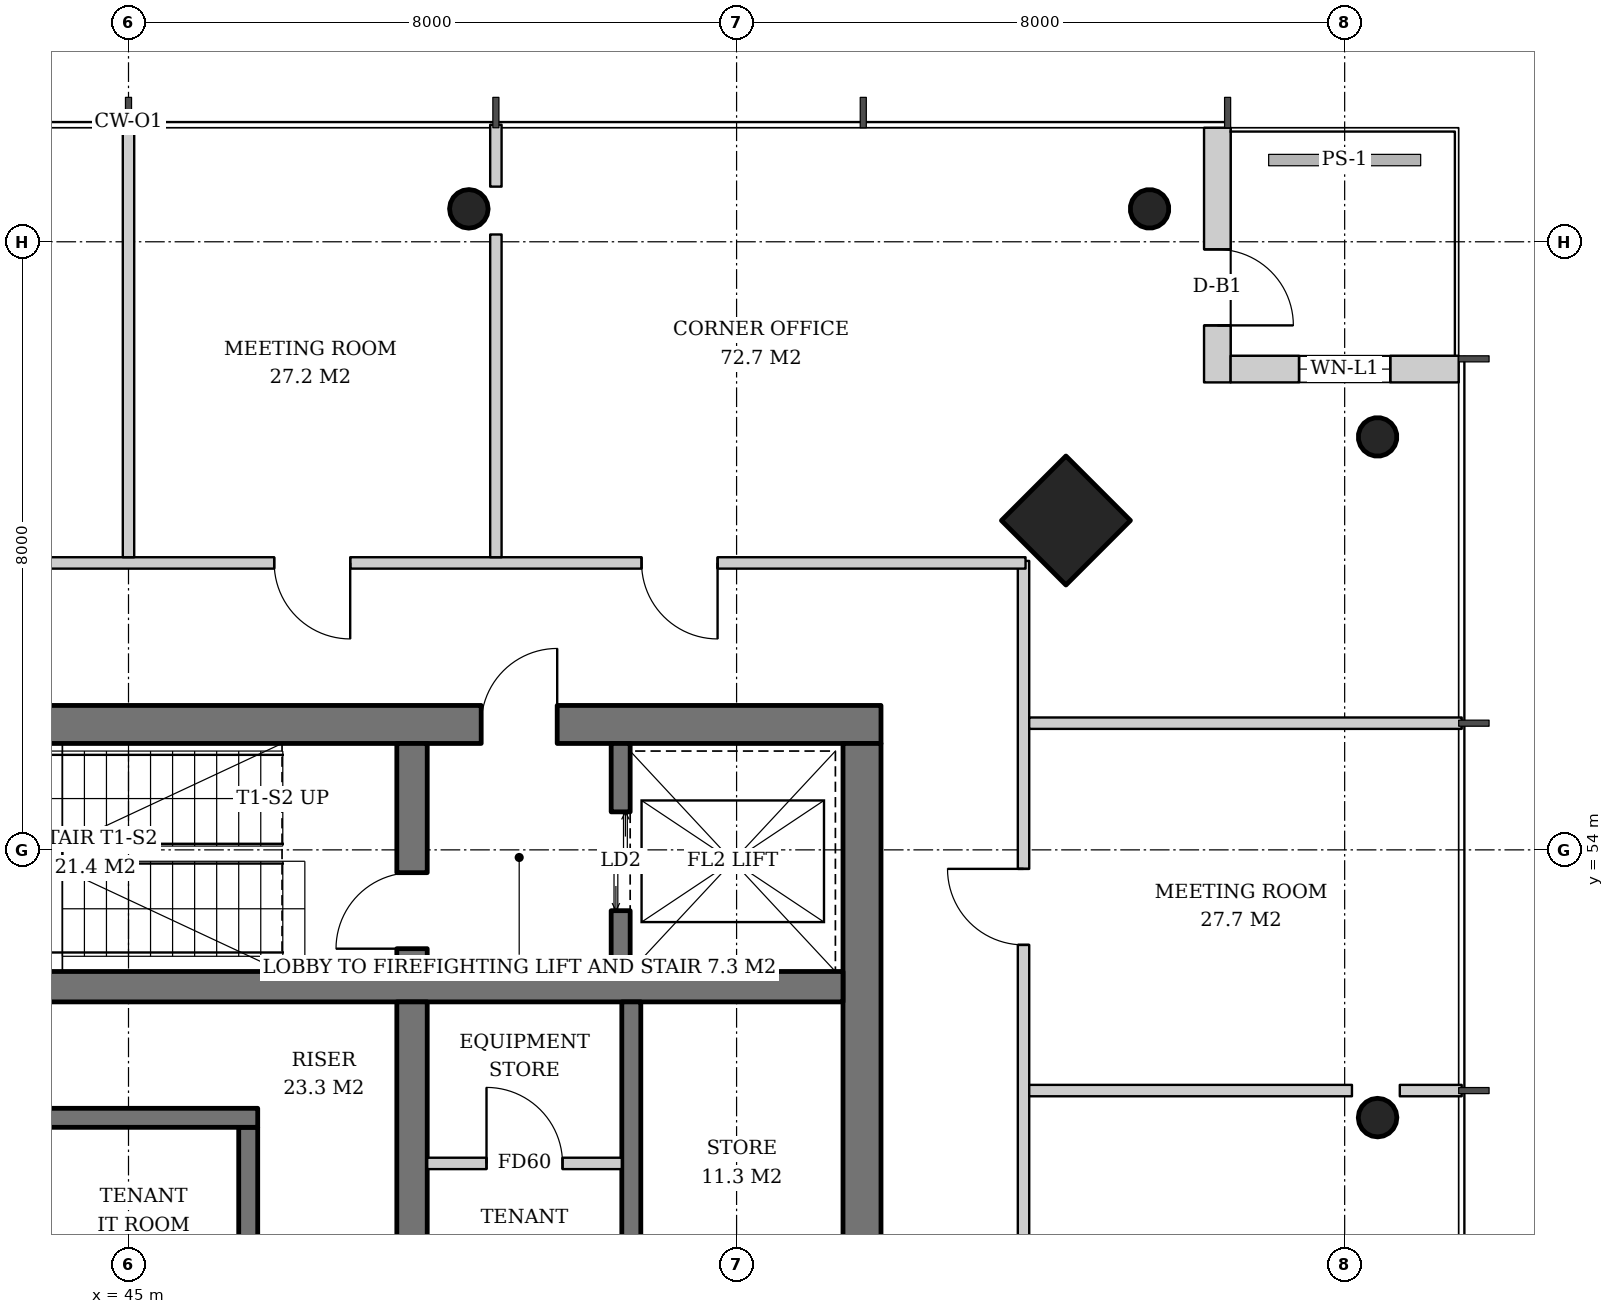
"""IFC4 building model, lengths in metres.
Left out: names, types, materials, properties, quantities, classifications, styles, units other than length and angle.
Written with IfcOpenShell. Run it as: python <this file> out.ifc"""

import sys

from ifc_helpers import new_model, si_unit, direction, frame, frame_2d, origin, origin_2d, place, context, subcontext, project, spatial, rectangle, hollow_circle, extrude, element, fill, save


model = new_model("IFC4")
c1 = context("Model", 3, precision=1e-05, world=origin(), true_north=direction((0.0, 1.0)))
c2 = subcontext(c1, "Body", "Model", "MODEL_VIEW")
j1 = project(units=[si_unit("LENGTHUNIT", "METRE"), si_unit("PLANEANGLEUNIT", "RADIAN")], contexts=[c1])
p1 = place(None, origin())
s1 = spatial("IfcSite", under=j1, at=p1, CompositionType="ELEMENT")
p2 = place(p1, origin())
s2 = spatial("IfcBuilding", under=s1, at=p2, CompositionType="ELEMENT")
p3 = place(p2, frame((0.0, 0.0, 256.6)))
s3 = spatial("IfcBuildingStorey", under=s2, at=p3, CompositionType="ELEMENT", Elevation=256.6)
p4 = place(p3, frame((57.371, 58.371, 0.0), z_axis=(-0.031900153262, -0.031900153262, 0.998981861919), x_axis=(0.707106781187, -0.707106781187, 0.0)))
e1 = element("IfcColumn", 1, at=p4, inside=s3, PredefinedType="COLUMN", context=c2, shape_type="SweptSolid", body=[
    extrude(rectangle(XDim=1.2, YDim=1.2, at=origin_2d()), origin(), (0.0, 0.0, 1.0), 3.804),
])
p5 = place(p3, frame((61.471, 59.471, 0.0), z_axis=(-0.031900153262, -0.031900153262, 0.998981861919), x_axis=(0.707106781187, -0.707106781187, 0.0)))
e2 = element("IfcColumn", 2, at=p5, inside=s3, PredefinedType="COLUMN", context=c2, shape_type="SweptSolid", body=[
    extrude(hollow_circle(Radius=0.254, WallThickness=0.02, at=origin_2d()), origin(), (0.0, 0.0, 1.0), 3.804),
])
p6 = place(p3, frame((61.471, 50.49, 0.0), z_axis=(-0.031914583439, -0.010659599298, 0.999433755837), x_axis=(0.316800238982, -0.948492281772, 0.0)))
e3 = element("IfcColumn", 3, at=p6, inside=s3, PredefinedType="COLUMN", context=c2, shape_type="SweptSolid", body=[
    extrude(hollow_circle(Radius=0.254, WallThickness=0.02, at=origin_2d()), origin(), (0.0, 0.0, 1.0), 3.802),
])
p7 = place(p3, frame((58.471, 62.471, 0.0), z_axis=(-0.031900153262, -0.031900153262, 0.998981861919), x_axis=(0.707106781187, -0.707106781187, 0.0)))
e4 = element("IfcColumn", 4, at=p7, inside=s3, PredefinedType="COLUMN", context=c2, shape_type="SweptSolid", body=[
    extrude(hollow_circle(Radius=0.254, WallThickness=0.02, at=origin_2d()), origin(), (0.0, 0.0, 1.0), 3.804),
])
p8 = place(p3, frame((49.49, 62.471, 0.0), z_axis=(-0.010659599298, -0.031914583439, 0.999433755837), x_axis=(0.948492281772, -0.316800238982, 0.0)))
e5 = element("IfcColumn", 5, at=p8, inside=s3, PredefinedType="COLUMN", context=c2, shape_type="SweptSolid", body=[
    extrude(hollow_circle(Radius=0.254, WallThickness=0.02, at=origin_2d()), origin(), (0.0, 0.0, 1.0), 3.802),
])
p9 = place(p3, frame((35.1, 55.65, 0.0), z_axis=(0.0, 0.0, 1.0), x_axis=(1.0, 0.0, 0.0)))
e6 = element("IfcWall", 6, at=p9, inside=s3, PredefinedType="SHEAR", context=c2, shape_type="SweptSolid", body=[
    extrude(rectangle(XDim=19.8, YDim=0.5, at=frame_2d((9.9, 0.0))), origin(), (0.0, 0.0, 1.0), 3.8),
])
p10 = place(p9, frame((14.54, 0.0, 0.0)))
e7 = element("IfcOpeningElement", 7, at=p10, cuts=e6, PredefinedType="OPENING", context=c2, shape_type="SweptSolid", body=[
    extrude(rectangle(XDim=1.0, YDim=2.1, at=frame_2d((0.5, 1.05))), frame((0.0, 0.26, 0.0), z_axis=(0.0, -1.0, 0.0), x_axis=(1.0, 0.0, 0.0)), (0.0, 0.0, 1.0), 0.52),
])
p11 = place(p9, frame((0.96, 0.0, 0.0)))
e8 = element("IfcOpeningElement", 8, at=p11, cuts=e6, PredefinedType="OPENING", context=c2, shape_type="SweptSolid", body=[
    extrude(rectangle(XDim=1.0, YDim=2.1, at=frame_2d((0.5, 1.05))), frame((0.0, 0.26, 0.0), z_axis=(0.0, -1.0, 0.0), x_axis=(1.0, 0.0, 0.0)), (0.0, 0.0, 1.0), 0.52),
])
p12 = place(p9, frame((2.47, 0.0, 0.0)))
e9 = element("IfcOpeningElement", 9, at=p12, cuts=e6, PredefinedType="OPENING", context=c2, shape_type="SweptSolid", body=[
    extrude(rectangle(XDim=1.0, YDim=2.1, at=frame_2d((0.5, 1.05))), frame((0.0, 0.26, 0.0), z_axis=(0.0, -1.0, 0.0), x_axis=(1.0, 0.0, 0.0)), (0.0, 0.0, 1.0), 0.52),
])
p13 = place(p9, frame((3.99, 0.0, 0.0)))
e10 = element("IfcOpeningElement", 10, at=p13, cuts=e6, PredefinedType="OPENING", context=c2, shape_type="SweptSolid", body=[
    extrude(rectangle(XDim=1.0, YDim=2.1, at=frame_2d((0.5, 1.05))), frame((0.0, 0.26, 0.0), z_axis=(0.0, -1.0, 0.0), x_axis=(1.0, 0.0, 0.0)), (0.0, 0.0, 1.0), 0.52),
])
p14 = place(p3, frame((54.65, 36.6, 0.0), z_axis=(0.0, 0.0, 1.0), x_axis=(0.0, 1.0, 0.0)))
e11 = element("IfcWall", 11, at=p14, inside=s3, PredefinedType="SHEAR", context=c2, shape_type="SweptSolid", body=[
    extrude(rectangle(XDim=18.8, YDim=0.5, at=frame_2d((9.4, 0.0))), origin(), (0.0, 0.0, 1.0), 3.8),
])
p15 = place(p14, frame((8.5, 0.0, 0.0)))
e12 = element("IfcOpeningElement", 12, at=p15, cuts=e11, PredefinedType="OPENING", context=c2, shape_type="SweptSolid", body=[
    extrude(rectangle(XDim=1.8, YDim=2.4, at=frame_2d((0.9, 1.2))), frame((0.0, 0.26, 0.0), z_axis=(0.0, -1.0, 0.0), x_axis=(1.0, 0.0, 0.0)), (0.0, 0.0, 1.0), 0.52),
])
p16 = place(p3, frame((35.6, 52.2, 0.0), z_axis=(0.0, 0.0, 1.0), x_axis=(1.0, 0.0, 0.0)))
e13 = element("IfcWall", 13, at=p16, inside=s3, PredefinedType="SHEAR", context=c2, shape_type="SweptSolid", body=[
    extrude(rectangle(XDim=18.8, YDim=0.4, at=frame_2d((9.4, 0.0))), origin(), (0.0, 0.0, 1.0), 3.8),
])
p17 = place(p3, frame((48.73, 40.0, 0.0), z_axis=(0.0, 0.0, 1.0), x_axis=(0.0, 1.0, 0.0)))
e14 = element("IfcWall", 14, at=p17, inside=s3, PredefinedType="SHEAR", context=c2, shape_type="SweptSolid", body=[
    extrude(rectangle(XDim=12.0, YDim=0.4, at=frame_2d((6.0, 0.0))), origin(), (0.0, 0.0, 1.0), 3.8),
])
p18 = place(p3, frame((48.73, 52.4, 0.0), z_axis=(0.0, 0.0, 1.0), x_axis=(0.0, 1.0, 0.0)))
e15 = element("IfcWall", 15, at=p18, inside=s3, PredefinedType="SHEAR", context=c2, shape_type="SweptSolid", body=[
    extrude(rectangle(XDim=3.0, YDim=0.4, at=frame_2d((1.5, 0.0))), origin(), (0.0, 0.0, 1.0), 3.8),
])
p19 = place(p18, frame((0.3, 0.0, 0.0)))
e16 = element("IfcOpeningElement", 16, at=p19, cuts=e15, PredefinedType="OPENING", context=c2, shape_type="SweptSolid", body=[
    extrude(rectangle(XDim=1.0, YDim=2.1, at=frame_2d((0.5, 1.05))), frame((0.0, 0.21, 0.0), z_axis=(0.0, -1.0, 0.0), x_axis=(1.0, 0.0, 0.0)), (0.0, 0.0, 1.0), 0.42),
])
p20 = place(p3, frame((59.325, 63.5, 0.0), z_axis=(0.0, 0.0, 1.0), x_axis=(0.0, -1.0, 0.0)))
e17 = element("IfcWall", 17, at=p20, inside=s3, PredefinedType="SOLIDWALL", context=c2, shape_type="SweptSolid", body=[
    extrude(rectangle(XDim=3.35, YDim=0.35, at=frame_2d((1.675, 0.0))), origin(), (0.0, 0.0, 1.0), 3.62),
])
p21 = place(p20, frame((1.6, 0.0, 0.0)))
e18 = element("IfcOpeningElement", 18, at=p21, cuts=e17, PredefinedType="OPENING", context=c2, shape_type="SweptSolid", body=[
    extrude(rectangle(XDim=1.0, YDim=2.4, at=frame_2d((0.5, 1.2))), frame((0.0, 0.185, 0.0), z_axis=(0.0, -1.0, 0.0), x_axis=(1.0, 0.0, 0.0)), (0.0, 0.0, 1.0), 0.37),
])
p22 = place(p3, frame((59.5, 60.325, 0.0), z_axis=(0.0, 0.0, 1.0), x_axis=(1.0, 0.0, 0.0)))
e19 = element("IfcWall", 19, at=p22, inside=s3, PredefinedType="SOLIDWALL", context=c2, shape_type="SweptSolid", body=[
    extrude(rectangle(XDim=3.0, YDim=0.35, at=frame_2d((1.5, 0.0))), origin(), (0.0, 0.0, 1.0), 3.62),
])
p23 = place(p22, frame((0.9, 0.0, 0.6)))
e20 = element("IfcOpeningElement", 20, at=p23, cuts=e19, PredefinedType="OPENING", context=c2, shape_type="SweptSolid", body=[
    extrude(rectangle(XDim=1.2, YDim=2.55, at=frame_2d((0.6, 1.275))), frame((0.0, 0.185, 0.0), z_axis=(0.0, -1.0, 0.0), x_axis=(1.0, 0.0, 0.0)), (0.0, 0.0, 1.0), 0.37),
])
p24 = place(p3, frame((51.475, 52.4, 0.0), z_axis=(0.0, 0.0, 1.0), x_axis=(0.0, 1.0, 0.0)))
e21 = element("IfcWall", 21, at=p24, inside=s3, PredefinedType="SHEAR", context=c2, shape_type="SweptSolid", body=[
    extrude(rectangle(XDim=3.0, YDim=0.25, at=frame_2d((1.5, 0.0))), origin(), (0.0, 0.0, 1.0), 3.8),
])
p25 = place(p24, frame((0.8, 0.0, 0.0)))
e22 = element("IfcOpeningElement", 22, at=p25, cuts=e21, PredefinedType="OPENING", context=c2, shape_type="SweptSolid", body=[
    extrude(rectangle(XDim=1.3, YDim=2.2, at=frame_2d((0.65, 1.1))), frame((0.0, 0.135, 0.0), z_axis=(0.0, -1.0, 0.0), x_axis=(1.0, 0.0, 0.0)), (0.0, 0.0, 1.0), 0.27),
])
p26 = place(p3, frame((46.575, 47.75, 0.0), z_axis=(0.0, 0.0, 1.0), x_axis=(0.0, 1.0, 0.0)))
e23 = element("IfcWall", 23, at=p26, inside=s3, PredefinedType="SHEAR", context=c2, shape_type="SweptSolid", body=[
    extrude(rectangle(XDim=2.6, YDim=0.25, at=frame_2d((1.3, 0.0))), origin(), (0.0, 0.0, 1.0), 3.8),
])
p27 = place(p3, frame((35.6, 50.475, 0.0), z_axis=(0.0, 0.0, 1.0), x_axis=(1.0, 0.0, 0.0)))
e24 = element("IfcWall", 24, at=p27, inside=s3, PredefinedType="SHEAR", context=c2, shape_type="SweptSolid", body=[
    extrude(rectangle(XDim=11.1, YDim=0.25, at=frame_2d((5.55, 0.0))), origin(), (0.0, 0.0, 1.0), 3.8),
])
p28 = place(p3, frame((51.615, 47.75, 0.0), z_axis=(0.0, 0.0, 1.0), x_axis=(0.0, 1.0, 0.0)))
e25 = element("IfcWall", 25, at=p28, inside=s3, PredefinedType="SHEAR", context=c2, shape_type="SweptSolid", body=[
    extrude(rectangle(XDim=4.25, YDim=0.25, at=frame_2d((2.125, 0.0))), origin(), (0.0, 0.0, 1.0), 3.8),
])
p29 = place(p3, frame((48.93, 49.875, 0.0), z_axis=(0.0, 0.0, 1.0), x_axis=(1.0, 0.0, 0.0)))
e26 = element("IfcWall", 26, at=p29, inside=s3, PredefinedType="SOLIDWALL", context=c2, shape_type="SweptSolid", body=[
    extrude(rectangle(XDim=2.56, YDim=0.15, at=frame_2d((1.28, 0.0))), origin(), (0.0, 0.0, 1.0), 3.62),
])
p30 = place(p29, frame((0.78, 0.0, 0.0)))
e27 = element("IfcOpeningElement", 27, at=p30, cuts=e26, PredefinedType="OPENING", context=c2, shape_type="SweptSolid", body=[
    extrude(rectangle(XDim=1.0, YDim=2.1, at=frame_2d((0.5, 1.05))), frame((0.0, 0.085, 0.0), z_axis=(0.0, -1.0, 0.0), x_axis=(1.0, 0.0, 0.0)), (0.0, 0.0, 1.0), 0.17),
])
p31 = place(p3, frame((56.775, 34.198, 0.0), z_axis=(0.0, 0.0, 1.0), x_axis=(0.0, 1.0, 0.0)))
e28 = element("IfcWall", 28, at=p31, inside=s3, PredefinedType="PARTITIONING", context=c2, shape_type="SweptSolid", body=[
    extrude(rectangle(XDim=23.603, YDim=0.15, at=frame_2d((11.802, 0.0))), origin(), (0.0, 0.0, 1.0), 3.02),
])
p32 = place(p31, frame((4.052, 0.0, 0.0)))
e29 = element("IfcOpeningElement", 29, at=p32, cuts=e28, PredefinedType="OPENING", context=c2, shape_type="SweptSolid", body=[
    extrude(rectangle(XDim=1.0, YDim=2.1, at=frame_2d((0.5, 1.05))), frame((0.0, 0.085, 0.0), z_axis=(0.0, -1.0, 0.0), x_axis=(1.0, 0.0, 0.0)), (0.0, 0.0, 1.0), 0.17),
])
p33 = place(p31, frame((8.885, 0.0, 0.0)))
e30 = element("IfcOpeningElement", 30, at=p33, cuts=e28, PredefinedType="OPENING", context=c2, shape_type="SweptSolid", body=[
    extrude(rectangle(XDim=1.0, YDim=2.1, at=frame_2d((0.5, 1.05))), frame((0.0, 0.085, 0.0), z_axis=(0.0, -1.0, 0.0), x_axis=(1.0, 0.0, 0.0)), (0.0, 0.0, 1.0), 0.17),
])
p34 = place(p31, frame((13.718, 0.0, 0.0)))
e31 = element("IfcOpeningElement", 31, at=p34, cuts=e28, PredefinedType="OPENING", context=c2, shape_type="SweptSolid", body=[
    extrude(rectangle(XDim=1.0, YDim=2.1, at=frame_2d((0.5, 1.05))), frame((0.0, 0.085, 0.0), z_axis=(0.0, -1.0, 0.0), x_axis=(1.0, 0.0, 0.0)), (0.0, 0.0, 1.0), 0.17),
])
p35 = place(p31, frame((18.552, 0.0, 0.0)))
e32 = element("IfcOpeningElement", 32, at=p35, cuts=e28, PredefinedType="OPENING", context=c2, shape_type="SweptSolid", body=[
    extrude(rectangle(XDim=1.0, YDim=2.1, at=frame_2d((0.5, 1.05))), frame((0.0, 0.085, 0.0), z_axis=(0.0, -1.0, 0.0), x_axis=(1.0, 0.0, 0.0)), (0.0, 0.0, 1.0), 0.17),
])
p36 = place(p3, frame((56.85, 50.833, 0.0), z_axis=(0.0, 0.0, 1.0), x_axis=(1.0, 0.0, 0.0)))
e33 = element("IfcWall", 33, at=p36, inside=s3, PredefinedType="PARTITIONING", context=c2, shape_type="SweptSolid", body=[
    extrude(rectangle(XDim=4.246, YDim=0.15, at=frame_2d((2.123, 0.0))), origin(), (0.0, 0.0, 1.0), 3.62),
])
p37 = place(p3, frame((61.725, 50.833, 0.0), z_axis=(0.0, 0.0, 1.0), x_axis=(1.0, 0.0, 0.0)))
e34 = element("IfcWall", 34, at=p37, inside=s3, PredefinedType="PARTITIONING", context=c2, shape_type="SweptSolid", body=[
    extrude(rectangle(XDim=0.815, YDim=0.15, at=frame_2d((0.407, 0.0))), origin(), (0.0, 0.0, 1.0), 3.62),
])
p38 = place(p3, frame((56.85, 55.667, 0.0), z_axis=(0.0, 0.0, 1.0), x_axis=(1.0, 0.0, 0.0)))
e35 = element("IfcWall", 35, at=p38, inside=s3, PredefinedType="PARTITIONING", context=c2, shape_type="SweptSolid", body=[
    extrude(rectangle(XDim=5.69, YDim=0.15, at=frame_2d((2.845, 0.0))), origin(), (0.0, 0.0, 1.0), 3.12),
])
p39 = place(p3, frame((56.802, 57.775, 0.0), z_axis=(0.0, 0.0, 1.0), x_axis=(-1.0, 0.0, 0.0)))
e36 = element("IfcWall", 36, at=p39, inside=s3, PredefinedType="PARTITIONING", context=c2, shape_type="SweptSolid", body=[
    extrude(rectangle(XDim=23.603, YDim=0.15, at=frame_2d((11.802, 0.0))), origin(), (0.0, 0.0, 1.0), 3.02),
])
p40 = place(p39, frame((4.052, 0.0, 0.0)))
e37 = element("IfcOpeningElement", 37, at=p40, cuts=e36, PredefinedType="OPENING", context=c2, shape_type="SweptSolid", body=[
    extrude(rectangle(XDim=1.0, YDim=2.1, at=frame_2d((0.5, 1.05))), frame((0.0, 0.085, 0.0), z_axis=(0.0, -1.0, 0.0), x_axis=(1.0, 0.0, 0.0)), (0.0, 0.0, 1.0), 0.17),
])
p41 = place(p39, frame((8.885, 0.0, 0.0)))
e38 = element("IfcOpeningElement", 38, at=p41, cuts=e36, PredefinedType="OPENING", context=c2, shape_type="SweptSolid", body=[
    extrude(rectangle(XDim=1.0, YDim=2.1, at=frame_2d((0.5, 1.05))), frame((0.0, 0.085, 0.0), z_axis=(0.0, -1.0, 0.0), x_axis=(1.0, 0.0, 0.0)), (0.0, 0.0, 1.0), 0.17),
])
p42 = place(p39, frame((13.318, 0.0, 0.0)))
e39 = element("IfcOpeningElement", 39, at=p42, cuts=e36, PredefinedType="OPENING", context=c2, shape_type="SweptSolid", body=[
    extrude(rectangle(XDim=1.8, YDim=2.4, at=frame_2d((0.9, 1.2))), frame((0.0, 0.085, 0.0), z_axis=(0.0, -1.0, 0.0), x_axis=(1.0, 0.0, 0.0)), (0.0, 0.0, 1.0), 0.17),
])
p43 = place(p3, frame((49.833, 57.85, 0.0), z_axis=(0.0, 0.0, 1.0), x_axis=(0.0, 1.0, 0.0)))
e40 = element("IfcWall", 40, at=p43, inside=s3, PredefinedType="PARTITIONING", context=c2, shape_type="SweptSolid", body=[
    extrude(rectangle(XDim=4.246, YDim=0.15, at=frame_2d((2.123, 0.0))), origin(), (0.0, 0.0, 1.0), 3.62),
])
p44 = place(p3, frame((49.833, 62.725, 0.0), z_axis=(0.0, 0.0, 1.0), x_axis=(0.0, 1.0, 0.0)))
e41 = element("IfcWall", 41, at=p44, inside=s3, PredefinedType="PARTITIONING", context=c2, shape_type="SweptSolid", body=[
    extrude(rectangle(XDim=0.815, YDim=0.15, at=frame_2d((0.407, 0.0))), origin(), (0.0, 0.0, 1.0), 3.62),
])
p45 = place(p3, frame((45.0, 57.85, 0.0), z_axis=(0.0, 0.0, 1.0), x_axis=(0.0, 1.0, 0.0)))
e42 = element("IfcWall", 42, at=p45, inside=s3, PredefinedType="PARTITIONING", context=c2, shape_type="SweptSolid", body=[
    extrude(rectangle(XDim=5.69, YDim=0.15, at=frame_2d((2.845, 0.0))), origin(), (0.0, 0.0, 1.0), 3.12),
])
p46 = place(p21, origin())
e43 = element("IfcDoor", 43, at=p46, inside=s3, OperationType="SINGLE_SWING_RIGHT", PredefinedType="DOOR", context=c2, shape_type="SweptSolid", body=[
    extrude(rectangle(XDim=1.0, YDim=2.4, at=frame_2d((0.5, 1.2))), frame((0.0, 0.025, 0.0), z_axis=(0.0, -1.0, 0.0), x_axis=(1.0, 0.0, 0.0)), (0.0, 0.0, 1.0), 0.05),
])
fill(e18, e43)
p47 = place(p23, origin())
e44 = element("IfcWindow", 44, at=p47, inside=s3, PartitioningType="SINGLE_PANEL", PredefinedType="WINDOW", context=c2, shape_type="SweptSolid", body=[
    extrude(rectangle(XDim=1.2, YDim=2.55, at=frame_2d((0.6, 1.275))), frame((0.0, 0.03, 0.0), z_axis=(0.0, -1.0, 0.0), x_axis=(1.0, 0.0, 0.0)), (0.0, 0.0, 1.0), 0.06),
])
fill(e20, e44)
p48 = place(p25, origin())
e45 = element("IfcDoor", 45, at=p48, inside=s3, OperationType="DOUBLE_DOOR_SLIDING", PredefinedType="DOOR", context=c2, shape_type="SweptSolid", body=[
    extrude(rectangle(XDim=1.3, YDim=2.2, at=frame_2d((0.65, 1.1))), frame((0.0, 0.025, 0.0), z_axis=(0.0, -1.0, 0.0), x_axis=(1.0, 0.0, 0.0)), (0.0, 0.0, 1.0), 0.05),
])
fill(e22, e45)
p49 = place(p30, origin())
e46 = element("IfcDoor", 46, at=p49, inside=s3, OperationType="SINGLE_SWING_LEFT", PredefinedType="DOOR", context=c2, shape_type="SweptSolid", body=[
    extrude(rectangle(XDim=1.0, YDim=2.1, at=frame_2d((0.5, 1.05))), frame((0.0, 0.025, 0.0), z_axis=(0.0, -1.0, 0.0), x_axis=(1.0, 0.0, 0.0)), (0.0, 0.0, 1.0), 0.05),
])
fill(e27, e46)
p50 = place(p19, origin())
e47 = element("IfcDoor", 47, at=p50, inside=s3, OperationType="SINGLE_SWING_LEFT", PredefinedType="DOOR", context=c2, shape_type="SweptSolid", body=[
    extrude(rectangle(XDim=1.0, YDim=2.1, at=frame_2d((0.5, 1.05))), frame((0.0, 0.025, 0.0), z_axis=(0.0, -1.0, 0.0), x_axis=(1.0, 0.0, 0.0)), (0.0, 0.0, 1.0), 0.05),
])
fill(e16, e47)
p51 = place(p10, origin())
e48 = element("IfcDoor", 48, at=p51, inside=s3, OperationType="SINGLE_SWING_RIGHT", PredefinedType="DOOR", context=c2, shape_type="SweptSolid", body=[
    extrude(rectangle(XDim=1.0, YDim=2.1, at=frame_2d((0.5, 1.05))), frame((0.0, 0.025, 0.0), z_axis=(0.0, -1.0, 0.0), x_axis=(1.0, 0.0, 0.0)), (0.0, 0.0, 1.0), 0.05),
])
fill(e7, e48)
p52 = place(p35, origin())
e49 = element("IfcDoor", 49, at=p52, inside=s3, OperationType="SINGLE_SWING_RIGHT", PredefinedType="DOOR", context=c2, shape_type="SweptSolid", body=[
    extrude(rectangle(XDim=1.0, YDim=2.1, at=frame_2d((0.5, 1.05))), frame((0.0, 0.025, 0.0), z_axis=(0.0, -1.0, 0.0), x_axis=(1.0, 0.0, 0.0)), (0.0, 0.0, 1.0), 0.05),
])
fill(e32, e49)
p53 = place(p40, origin())
e50 = element("IfcDoor", 50, at=p53, inside=s3, OperationType="SINGLE_SWING_LEFT", PredefinedType="DOOR", context=c2, shape_type="SweptSolid", body=[
    extrude(rectangle(XDim=1.0, YDim=2.1, at=frame_2d((0.5, 1.05))), frame((0.0, 0.025, 0.0), z_axis=(0.0, -1.0, 0.0), x_axis=(1.0, 0.0, 0.0)), (0.0, 0.0, 1.0), 0.05),
])
fill(e37, e50)
p54 = place(p41, origin())
e51 = element("IfcDoor", 51, at=p54, inside=s3, OperationType="SINGLE_SWING_LEFT", PredefinedType="DOOR", context=c2, shape_type="SweptSolid", body=[
    extrude(rectangle(XDim=1.0, YDim=2.1, at=frame_2d((0.5, 1.05))), frame((0.0, 0.025, 0.0), z_axis=(0.0, -1.0, 0.0), x_axis=(1.0, 0.0, 0.0)), (0.0, 0.0, 1.0), 0.05),
])
fill(e38, e51)
save(model, sys.argv[1])
